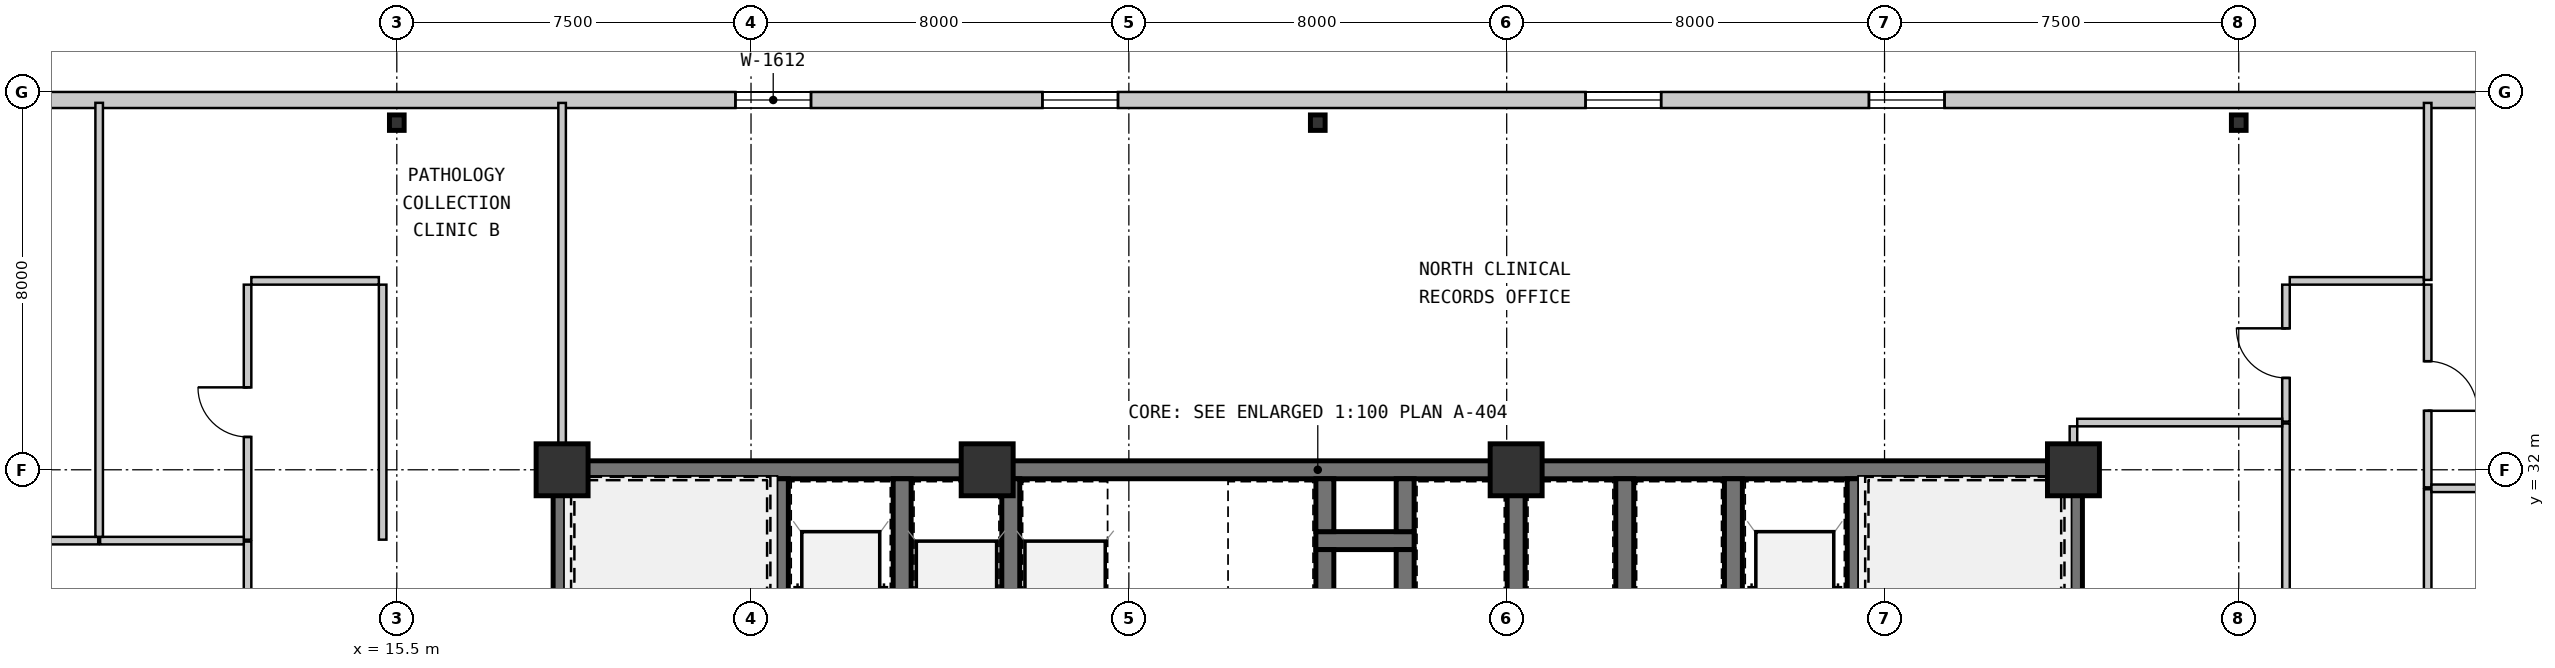
"""IFC4 building model, lengths in metres.
Left out: names, types, materials, properties, quantities, classifications, styles, units other than length and angle.
Written with IfcOpenShell. Run it as: python <this file> out.ifc"""

import sys

from ifc_helpers import new_model, si_unit, direction, frame, frame_2d, origin, origin_2d, place, context, subcontext, project, spatial, rectangle, i_section, extrude, source, transform, mapped, element, fill, save


model = new_model("IFC4")
c1 = context("Model", 3, precision=1e-05, world=origin(), true_north=direction((0.0, 1.0)))
c2 = subcontext(c1, "Body", "Model", "MODEL_VIEW")
j1 = project(units=[si_unit("LENGTHUNIT", "METRE"), si_unit("PLANEANGLEUNIT", "RADIAN")], contexts=[c1])
p1 = place(None, origin())
s1 = spatial("IfcSite", under=j1, at=p1, CompositionType="ELEMENT")
p2 = place(p1, origin())
s2 = spatial("IfcBuilding", under=s1, at=p2, CompositionType="ELEMENT")
p3 = place(p2, frame((0.0, 0.0, 4.55)))
s3 = spatial("IfcBuildingStorey", under=s2, at=p3, CompositionType="ELEMENT", Elevation=4.55)
m1 = source(origin(), c2, "Body", "SweptSolid", [
    extrude(rectangle(XDim=1.1, YDim=1.1, at=origin_2d()), origin(), (0.0, 0.0, 1.0), 3.85),
])
for number, where, z_axis, x_axis in (
    (1, (19.0, 32.0, 0.0), (0.0, 0.0, 1.0), (1.0, 0.0, 0.0)),
    (2, (28.0, 32.0, 0.0), (0.0, 0.0, 1.0), (1.0, 0.0, 0.0)),
    (3, (39.2, 32.0, 0.0), (0.0, 0.0, 1.0), (1.0, 0.0, 0.0)),
    (4, (51.0, 32.0, 0.0), (0.0, 0.0, 1.0), (1.0, 0.0, 0.0)),
):
    element("IfcColumn", number, at=place(p3, frame(where, z_axis=z_axis, x_axis=x_axis)), inside=s3, PredefinedType="COLUMN", context=c2, shape_type="MappedRepresentation", body=[
        mapped(m1, transform((0.0, 0.0, 0.0), scale=1.0)),
    ])
m2 = source(origin(), c2, "Body", "SweptSolid", [
    extrude(i_section(OverallWidth=0.311, OverallDepth=0.327, WebThickness=0.016, FlangeThickness=0.025, at=origin_2d()), origin(), (0.0, 0.0, 1.0), 3.85),
])
for number, where, z_axis, x_axis in (
    (5, (15.5, 39.35, 0.0), (0.0, 0.0, 1.0), (1.0, 0.0, 0.0)),
    (6, (35.0, 39.35, 0.0), (0.0, 0.0, 1.0), (1.0, 0.0, 0.0)),
    (7, (54.5, 39.35, 0.0), (0.0, 0.0, 1.0), (1.0, 0.0, 0.0)),
):
    element("IfcColumn", number, at=place(p3, frame(where, z_axis=z_axis, x_axis=x_axis)), inside=s3, PredefinedType="COLUMN", context=c2, shape_type="MappedRepresentation", body=[
        mapped(m2, transform((0.0, 0.0, 0.0), scale=1.0)),
    ])
m3 = source(origin(), c2, "Body", "SweptSolid", [
    extrude(rectangle(XDim=69.66, YDim=0.34, at=frame_2d((34.83, 0.0))), origin(), (0.0, 0.0, 1.0), 3.59),
])
p4 = place(p3, frame((0.17, 39.83, 0.0), z_axis=(0.0, 0.0, 1.0), x_axis=(1.0, 0.0, 0.0)))
e8 = element("IfcWall", 8, at=p4, inside=s3, PredefinedType="SOLIDWALL", context=c2, shape_type="MappedRepresentation", body=[
    mapped(m3, transform((0.0, 0.0, 0.0), scale=1.0)),
])
m4 = source(origin(), c2, "Body", "SweptSolid", [
    extrude(rectangle(XDim=1.6, YDim=1.2, at=frame_2d((0.8, 0.6))), frame((0.0, 0.18, 0.0), z_axis=(0.0, -1.0, 0.0), x_axis=(1.0, 0.0, 0.0)), (0.0, 0.0, 1.0), 0.36),
])
p5 = place(p4, frame((4.5, 0.0, 0.95)))
e9 = element("IfcOpeningElement", 9, at=p5, cuts=e8, PredefinedType="OPENING", context=c2, shape_type="MappedRepresentation", body=[
    mapped(m4, transform((0.0, 0.0, 0.0), scale=1.0)),
])
p6 = place(p4, frame((22.5, 0.0, 0.95)))
e10 = element("IfcOpeningElement", 10, at=p6, cuts=e8, PredefinedType="OPENING", context=c2, shape_type="MappedRepresentation", body=[
    mapped(m4, transform((0.0, 0.0, 0.0), scale=1.0)),
])
p7 = place(p4, frame((29.0, 0.0, 0.95)))
e11 = element("IfcOpeningElement", 11, at=p7, cuts=e8, PredefinedType="OPENING", context=c2, shape_type="MappedRepresentation", body=[
    mapped(m4, transform((0.0, 0.0, 0.0), scale=1.0)),
])
p8 = place(p4, frame((40.5, 0.0, 0.95)))
e12 = element("IfcOpeningElement", 12, at=p8, cuts=e8, PredefinedType="OPENING", context=c2, shape_type="MappedRepresentation", body=[
    mapped(m4, transform((0.0, 0.0, 0.0), scale=1.0)),
])
p9 = place(p4, frame((46.5, 0.0, 0.95)))
e13 = element("IfcOpeningElement", 13, at=p9, cuts=e8, PredefinedType="OPENING", context=c2, shape_type="MappedRepresentation", body=[
    mapped(m4, transform((0.0, 0.0, 0.0), scale=1.0)),
])
p10 = place(p4, frame((62.5, 0.0, 0.95)))
e14 = element("IfcOpeningElement", 14, at=p10, cuts=e8, PredefinedType="OPENING", context=c2, shape_type="MappedRepresentation", body=[
    mapped(m4, transform((0.0, 0.0, 0.0), scale=1.0)),
])
m5 = source(origin(), c2, "Body", "SweptSolid", [
    extrude(rectangle(XDim=9.19, YDim=0.38, at=frame_2d((4.595, 0.0))), origin(), (0.0, 0.0, 1.0), 3.59),
])
p11 = place(p3, frame((18.81, 32.0, 0.0), z_axis=(0.0, 0.0, 1.0), x_axis=(1.0, 0.0, 0.0)))
e15 = element("IfcWall", 15, at=p11, inside=s3, PredefinedType="SHEAR", context=c2, shape_type="MappedRepresentation", body=[
    mapped(m5, transform((0.0, 0.0, 0.0), scale=1.0)),
])
m6 = source(origin(), c2, "Body", "SweptSolid", [
    extrude(rectangle(XDim=11.2, YDim=0.38, at=frame_2d((5.6, 0.0))), origin(), (0.0, 0.0, 1.0), 3.59),
])
p12 = place(p3, frame((28.0, 32.0, 0.0), z_axis=(0.0, 0.0, 1.0), x_axis=(1.0, 0.0, 0.0)))
e16 = element("IfcWall", 16, at=p12, inside=s3, PredefinedType="SHEAR", context=c2, shape_type="MappedRepresentation", body=[
    mapped(m6, transform((0.0, 0.0, 0.0), scale=1.0)),
])
m7 = source(origin(), c2, "Body", "SweptSolid", [
    extrude(rectangle(XDim=11.99, YDim=0.38, at=frame_2d((5.995, 0.0))), origin(), (0.0, 0.0, 1.0), 3.59),
])
p13 = place(p3, frame((39.2, 32.0, 0.0), z_axis=(0.0, 0.0, 1.0), x_axis=(1.0, 0.0, 0.0)))
e17 = element("IfcWall", 17, at=p13, inside=s3, PredefinedType="SHEAR", context=c2, shape_type="MappedRepresentation", body=[
    mapped(m7, transform((0.0, 0.0, 0.0), scale=1.0)),
])
m8 = source(origin(), c2, "Body", "SweptSolid", [
    extrude(rectangle(XDim=3.61, YDim=0.38, at=frame_2d((1.805, 0.0))), origin(), (0.0, 0.0, 1.0), 3.59),
])
for number, where, z_axis, x_axis in (
    (18, (19.0, 28.2, 0.0), (0.0, 0.0, 1.0), (0.0, 1.0, 0.0)),
    (19, (51.0, 28.2, 0.0), (0.0, 0.0, 1.0), (0.0, 1.0, 0.0)),
):
    element("IfcWall", number, at=place(p3, frame(where, z_axis=z_axis, x_axis=x_axis)), inside=s3, PredefinedType="SHEAR", context=c2, shape_type="MappedRepresentation", body=[
        mapped(m8, transform((0.0, 0.0, 0.0), scale=1.0)),
    ])
m9 = source(origin(), c2, "Body", "SweptSolid", [
    extrude(rectangle(XDim=3.42, YDim=0.38, at=frame_2d((1.71, 0.0))), origin(), (0.0, 0.0, 1.0), 3.59),
])
for number, where, z_axis, x_axis in (
    (20, (23.6, 28.39, 0.0), (0.0, 0.0, 1.0), (0.0, 1.0, 0.0)),
    (21, (26.2, 28.39, 0.0), (0.0, 0.0, 1.0), (0.0, 1.0, 0.0)),
    (22, (46.4, 31.81, 0.0), (0.0, 0.0, 1.0), (0.0, -1.0, 0.0)),
    (23, (43.8, 31.81, 0.0), (0.0, 0.0, 1.0), (0.0, -1.0, 0.0)),
):
    element("IfcWall", number, at=place(p3, frame(where, z_axis=z_axis, x_axis=x_axis)), inside=s3, PredefinedType="SHEAR", context=c2, shape_type="MappedRepresentation", body=[
        mapped(m9, transform((0.0, 0.0, 0.0), scale=1.0)),
    ])
m10 = source(origin(), c2, "Body", "SweptSolid", [
    extrude(rectangle(XDim=2.08, YDim=0.38, at=frame_2d((1.04, 0.0))), origin(), (0.0, 0.0, 1.0), 3.59),
])
p14 = place(p3, frame((34.96, 30.5, 0.0), z_axis=(0.0, 0.0, 1.0), x_axis=(1.0, 0.0, 0.0)))
e24 = element("IfcWall", 24, at=p14, inside=s3, PredefinedType="SHEAR", context=c2, shape_type="MappedRepresentation", body=[
    mapped(m10, transform((0.0, 0.0, 0.0), scale=1.0)),
])
m11 = source(origin(), c2, "Body", "SweptSolid", [
    extrude(rectangle(XDim=1.12, YDim=0.38, at=frame_2d((0.56, 0.0))), origin(), (0.0, 0.0, 1.0), 3.59),
])
for number, where, z_axis, x_axis in (
    (25, (35.15, 31.81, 0.0), (0.0, 0.0, 1.0), (0.0, -1.0, 0.0)),
    (26, (36.85, 30.69, 0.0), (0.0, 0.0, 1.0), (0.0, 1.0, 0.0)),
    (27, (35.15, 30.31, 0.0), (0.0, 0.0, 1.0), (0.0, -1.0, 0.0)),
    (28, (36.85, 29.19, 0.0), (0.0, 0.0, 1.0), (0.0, 1.0, 0.0)),
):
    element("IfcWall", number, at=place(p3, frame(where, z_axis=z_axis, x_axis=x_axis)), inside=s3, PredefinedType="SHEAR", context=c2, shape_type="MappedRepresentation", body=[
        mapped(m11, transform((0.0, 0.0, 0.0), scale=1.0)),
    ])
for number, where, z_axis, x_axis in (
    (29, (28.5, 28.39, 0.0), (0.0, 0.0, 1.0), (0.0, 1.0, 0.0)),
    (30, (39.2, 28.39, 0.0), (0.0, 0.0, 1.0), (0.0, 1.0, 0.0)),
    (31, (41.5, 28.39, 0.0), (0.0, 0.0, 1.0), (0.0, 1.0, 0.0)),
):
    element("IfcWall", number, at=place(p3, frame(where, z_axis=z_axis, x_axis=x_axis)), inside=s3, PredefinedType="SHEAR", context=c2, shape_type="MappedRepresentation", body=[
        mapped(m9, transform((0.0, 0.0, 0.0), scale=1.0)),
    ])
m12 = source(origin(), c2, "Body", "SweptSolid", [
    extrude(rectangle(XDim=6.4, YDim=0.16, at=frame_2d((3.2, 0.0))), origin(), (0.0, 0.0, 1.0), 3.59),
])
p15 = place(p3, frame((12.34, 24.08, 0.0), z_axis=(0.0, 0.0, 1.0), x_axis=(0.0, 1.0, 0.0)))
e32 = element("IfcWall", 32, at=p15, inside=s3, PredefinedType="PARTITIONING", context=c2, shape_type="MappedRepresentation", body=[
    mapped(m12, transform((0.0, 0.0, 0.0), scale=1.0)),
])
m13 = source(origin(), c2, "Body", "SweptSolid", [
    extrude(rectangle(XDim=1.05, YDim=2.1, at=frame_2d((0.525, 1.05))), frame((0.0, 0.09, 0.0), z_axis=(0.0, -1.0, 0.0), x_axis=(1.0, 0.0, 0.0)), (0.0, 0.0, 1.0), 0.18),
])
p16 = place(p15, frame((2.645, 0.0, 0.0)))
e33 = element("IfcOpeningElement", 33, at=p16, cuts=e32, PredefinedType="OPENING", context=c2, shape_type="MappedRepresentation", body=[
    mapped(m13, transform((0.0, 0.0, 0.0), scale=1.0)),
])
m14 = source(origin(), c2, "Body", "SweptSolid", [
    extrude(rectangle(XDim=5.4, YDim=0.16, at=frame_2d((2.7, 0.0))), origin(), (0.0, 0.0, 1.0), 3.59),
])
p17 = place(p3, frame((12.34, 30.52, 0.0), z_axis=(0.0, 0.0, 1.0), x_axis=(0.0, 1.0, 0.0)))
e34 = element("IfcWall", 34, at=p17, inside=s3, PredefinedType="PARTITIONING", context=c2, shape_type="MappedRepresentation", body=[
    mapped(m14, transform((0.0, 0.0, 0.0), scale=1.0)),
])
p18 = place(p17, frame((2.175, 0.0, 0.0)))
e35 = element("IfcOpeningElement", 35, at=p18, cuts=e34, PredefinedType="OPENING", context=c2, shape_type="MappedRepresentation", body=[
    mapped(m13, transform((0.0, 0.0, 0.0), scale=1.0)),
])
p19 = place(p3, frame((15.2, 35.92, 0.0), z_axis=(0.0, 0.0, 1.0), x_axis=(0.0, -1.0, 0.0)))
e36 = element("IfcWall", 36, at=p19, inside=s3, PredefinedType="PARTITIONING", context=c2, shape_type="MappedRepresentation", body=[
    mapped(m14, transform((0.0, 0.0, 0.0), scale=1.0)),
])
m15 = source(origin(), c2, "Body", "SweptSolid", [
    extrude(rectangle(XDim=2.7, YDim=0.16, at=frame_2d((1.35, 0.0))), origin(), (0.0, 0.0, 1.0), 3.59),
])
p20 = place(p3, frame((12.42, 36.0, 0.0), z_axis=(0.0, 0.0, 1.0), x_axis=(1.0, 0.0, 0.0)))
e37 = element("IfcWall", 37, at=p20, inside=s3, PredefinedType="PARTITIONING", context=c2, shape_type="MappedRepresentation", body=[
    mapped(m15, transform((0.0, 0.0, 0.0), scale=1.0)),
])
m16 = source(origin(), c2, "Body", "SweptSolid", [
    extrude(rectangle(XDim=7.508, YDim=0.16, at=frame_2d((3.754, 0.0))), origin(), (0.0, 0.0, 1.0), 3.59),
])
p21 = place(p3, frame((58.5, 31.588, 0.0), z_axis=(0.0, 0.0, 1.0), x_axis=(0.0, -1.0, 0.0)))
e38 = element("IfcWall", 38, at=p21, inside=s3, PredefinedType="PARTITIONING", context=c2, shape_type="MappedRepresentation", body=[
    mapped(m16, transform((0.0, 0.0, 0.0), scale=1.0)),
])
m17 = source(origin(), c2, "Body", "SweptSolid", [
    extrude(rectangle(XDim=4.292, YDim=0.16, at=frame_2d((2.146, 0.0))), origin(), (0.0, 0.0, 1.0), 3.59),
])
p22 = place(p3, frame((58.5, 35.92, 0.0), z_axis=(0.0, 0.0, 1.0), x_axis=(0.0, -1.0, 0.0)))
e39 = element("IfcWall", 39, at=p22, inside=s3, PredefinedType="PARTITIONING", context=c2, shape_type="MappedRepresentation", body=[
    mapped(m17, transform((0.0, 0.0, 0.0), scale=1.0)),
])
p23 = place(p22, frame((1.621, 0.0, 0.0)))
e40 = element("IfcOpeningElement", 40, at=p23, cuts=e39, PredefinedType="OPENING", context=c2, shape_type="MappedRepresentation", body=[
    mapped(m13, transform((0.0, 0.0, 0.0), scale=1.0)),
])
m18 = source(origin(), c2, "Body", "SweptSolid", [
    extrude(rectangle(XDim=8.9, YDim=0.16, at=frame_2d((4.45, 0.0))), origin(), (0.0, 0.0, 1.0), 3.59),
])
p24 = place(p3, frame((55.5, 24.08, 0.0), z_axis=(0.0, 0.0, 1.0), x_axis=(0.0, 1.0, 0.0)))
e41 = element("IfcWall", 41, at=p24, inside=s3, PredefinedType="PARTITIONING", context=c2, shape_type="MappedRepresentation", body=[
    mapped(m18, transform((0.0, 0.0, 0.0), scale=1.0)),
])
p25 = place(p24, frame((3.895, 0.0, 0.0)))
e42 = element("IfcOpeningElement", 42, at=p25, cuts=e41, PredefinedType="OPENING", context=c2, shape_type="MappedRepresentation", body=[
    mapped(m13, transform((0.0, 0.0, 0.0), scale=1.0)),
])
m19 = source(origin(), c2, "Body", "SweptSolid", [
    extrude(rectangle(XDim=2.9, YDim=0.16, at=frame_2d((1.45, 0.0))), origin(), (0.0, 0.0, 1.0), 3.59),
])
p26 = place(p3, frame((55.5, 33.02, 0.0), z_axis=(0.0, 0.0, 1.0), x_axis=(0.0, 1.0, 0.0)))
e43 = element("IfcWall", 43, at=p26, inside=s3, PredefinedType="PARTITIONING", context=c2, shape_type="MappedRepresentation", body=[
    mapped(m19, transform((0.0, 0.0, 0.0), scale=1.0)),
])
p27 = place(p26, frame((0.925, 0.0, 0.0)))
e44 = element("IfcOpeningElement", 44, at=p27, cuts=e43, PredefinedType="OPENING", context=c2, shape_type="MappedRepresentation", body=[
    mapped(m13, transform((0.0, 0.0, 0.0), scale=1.0)),
])
m20 = source(origin(), c2, "Body", "SweptSolid", [
    extrude(rectangle(XDim=2.84, YDim=0.16, at=frame_2d((1.42, 0.0))), origin(), (0.0, 0.0, 1.0), 3.59),
])
p28 = place(p3, frame((55.58, 36.0, 0.0), z_axis=(0.0, 0.0, 1.0), x_axis=(1.0, 0.0, 0.0)))
e45 = element("IfcWall", 45, at=p28, inside=s3, PredefinedType="PARTITIONING", context=c2, shape_type="MappedRepresentation", body=[
    mapped(m20, transform((0.0, 0.0, 0.0), scale=1.0)),
])
m21 = source(origin(), c2, "Body", "SweptSolid", [
    extrude(rectangle(XDim=8.948, YDim=0.16, at=frame_2d((4.474, 0.0))), origin(), (0.0, 0.0, 1.0), 3.59),
])
p29 = place(p3, frame((0.23, 30.5, 0.0), z_axis=(0.0, 0.0, 1.0), x_axis=(1.0, 0.0, 0.0)))
e46 = element("IfcWall", 46, at=p29, inside=s3, PredefinedType="PARTITIONING", context=c2, shape_type="MappedRepresentation", body=[
    mapped(m21, transform((0.0, 0.0, 0.0), scale=1.0)),
])
m22 = source(origin(), c2, "Body", "SweptSolid", [
    extrude(rectangle(XDim=0.86, YDim=2.1, at=frame_2d((0.43, 1.05))), frame((0.0, 0.09, 0.0), z_axis=(0.0, -1.0, 0.0), x_axis=(1.0, 0.0, 0.0)), (0.0, 0.0, 1.0), 0.18),
])
p30 = place(p29, frame((4.044, 0.0, 0.0)))
e47 = element("IfcOpeningElement", 47, at=p30, cuts=e46, PredefinedType="OPENING", context=c2, shape_type="MappedRepresentation", body=[
    mapped(m22, transform((0.0, 0.0, 0.0), scale=1.0)),
])
m23 = source(origin(), c2, "Body", "SweptSolid", [
    extrude(rectangle(XDim=3.042, YDim=0.16, at=frame_2d((1.521, 0.0))), origin(), (0.0, 0.0, 1.0), 3.59),
])
p31 = place(p3, frame((9.218, 30.5, 0.0), z_axis=(0.0, 0.0, 1.0), x_axis=(1.0, 0.0, 0.0)))
e48 = element("IfcWall", 48, at=p31, inside=s3, PredefinedType="PARTITIONING", context=c2, shape_type="MappedRepresentation", body=[
    mapped(m23, transform((0.0, 0.0, 0.0), scale=1.0)),
])
m24 = source(origin(), c2, "Body", "SweptSolid", [
    extrude(rectangle(XDim=9.19, YDim=0.16, at=frame_2d((4.595, 0.0))), origin(), (0.0, 0.0, 1.0), 3.59),
])
p32 = place(p3, frame((9.198, 39.77, 0.0), z_axis=(0.0, 0.0, 1.0), x_axis=(0.0, -1.0, 0.0)))
e49 = element("IfcWall", 49, at=p32, inside=s3, PredefinedType="PARTITIONING", context=c2, shape_type="MappedRepresentation", body=[
    mapped(m24, transform((0.0, 0.0, 0.0), scale=1.0)),
])
m25 = source(origin(), c2, "Body", "SweptSolid", [
    extrude(rectangle(XDim=7.578, YDim=0.16, at=frame_2d((3.789, 0.0))), origin(), (0.0, 0.0, 1.0), 3.59),
])
p33 = place(p3, frame((19.0, 39.768, 0.0), z_axis=(0.0, 0.0, 1.0), x_axis=(0.0, -1.0, 0.0)))
e50 = element("IfcWall", 50, at=p33, inside=s3, PredefinedType="PARTITIONING", context=c2, shape_type="MappedRepresentation", body=[
    mapped(m25, transform((0.0, 0.0, 0.0), scale=1.0)),
])
m26 = source(origin(), c2, "Body", "SweptSolid", [
    extrude(rectangle(XDim=11.19, YDim=0.16, at=frame_2d((5.595, 0.0))), origin(), (0.0, 0.0, 1.0), 3.59),
])
p34 = place(p3, frame((58.58, 31.608, 0.0), z_axis=(0.0, 0.0, 1.0), x_axis=(1.0, 0.0, 0.0)))
e51 = element("IfcWall", 51, at=p34, inside=s3, PredefinedType="PARTITIONING", context=c2, shape_type="MappedRepresentation", body=[
    mapped(m26, transform((0.0, 0.0, 0.0), scale=1.0)),
])
m27 = source(origin(), c2, "Body", "SweptSolid", [
    extrude(rectangle(XDim=3.748, YDim=0.16, at=frame_2d((1.874, 0.0))), origin(), (0.0, 0.0, 1.0), 3.59),
])
p35 = place(p3, frame((58.5, 36.02, 0.0), z_axis=(0.0, 0.0, 1.0), x_axis=(0.0, 1.0, 0.0)))
e52 = element("IfcWall", 52, at=p35, inside=s3, PredefinedType="PARTITIONING", context=c2, shape_type="MappedRepresentation", body=[
    mapped(m27, transform((0.0, 0.0, 0.0), scale=1.0)),
])
m28 = source(origin(), c2, "Body", "SweptSolid", [
    extrude(rectangle(XDim=4.34, YDim=0.16, at=frame_2d((2.17, 0.0))), origin(), (0.0, 0.0, 1.0), 3.59),
])
p36 = place(p3, frame((51.08, 33.0, 0.0), z_axis=(0.0, 0.0, 1.0), x_axis=(1.0, 0.0, 0.0)))
e53 = element("IfcWall", 53, at=p36, inside=s3, PredefinedType="PARTITIONING", context=c2, shape_type="MappedRepresentation", body=[
    mapped(m28, transform((0.0, 0.0, 0.0), scale=1.0)),
])
m29 = source(origin(), c2, "Body", "SweptSolid", [
    extrude(rectangle(XDim=0.73, YDim=0.16, at=frame_2d((0.365, 0.0))), origin(), (0.0, 0.0, 1.0), 3.59),
])
p37 = place(p3, frame((51.0, 32.19, 0.0), z_axis=(0.0, 0.0, 1.0), x_axis=(0.0, 1.0, 0.0)))
e54 = element("IfcWall", 54, at=p37, inside=s3, PredefinedType="PARTITIONING", context=c2, shape_type="MappedRepresentation", body=[
    mapped(m29, transform((0.0, 0.0, 0.0), scale=1.0)),
])
m30 = source(origin(), c2, "Body", "SweptSolid", [
    extrude(rectangle(XDim=1.6, YDim=1.2, at=frame_2d((0.8, 0.6))), frame((0.0, 0.03, 0.0), z_axis=(0.0, -1.0, 0.0), x_axis=(1.0, 0.0, 0.0)), (0.0, 0.0, 1.0), 0.06),
])
p38 = place(p6, origin())
e55 = element("IfcWindow", 55, at=p38, inside=s3, PartitioningType="SINGLE_PANEL", PredefinedType="WINDOW", context=c2, shape_type="MappedRepresentation", body=[
    mapped(m30, transform((0.0, 0.0, 0.0), scale=1.0)),
])
fill(e10, e55)
p39 = place(p7, origin())
e56 = element("IfcWindow", 56, at=p39, inside=s3, PartitioningType="SINGLE_PANEL", PredefinedType="WINDOW", context=c2, shape_type="MappedRepresentation", body=[
    mapped(m30, transform((0.0, 0.0, 0.0), scale=1.0)),
])
fill(e11, e56)
p40 = place(p8, origin())
e57 = element("IfcWindow", 57, at=p40, inside=s3, PartitioningType="SINGLE_PANEL", PredefinedType="WINDOW", context=c2, shape_type="MappedRepresentation", body=[
    mapped(m30, transform((0.0, 0.0, 0.0), scale=1.0)),
])
fill(e12, e57)
p41 = place(p9, origin())
e58 = element("IfcWindow", 58, at=p41, inside=s3, PartitioningType="SINGLE_PANEL", PredefinedType="WINDOW", context=c2, shape_type="MappedRepresentation", body=[
    mapped(m30, transform((0.0, 0.0, 0.0), scale=1.0)),
])
fill(e13, e58)
m31 = source(origin(), c2, "Body", "SweptSolid", [
    extrude(rectangle(XDim=1.05, YDim=2.1, at=frame_2d((0.525, 1.05))), frame((0.0, 0.025, 0.0), z_axis=(0.0, -1.0, 0.0), x_axis=(1.0, 0.0, 0.0)), (0.0, 0.0, 1.0), 0.05),
])
p42 = place(p18, origin())
e59 = element("IfcDoor", 59, at=p42, inside=s3, OperationType="SINGLE_SWING_RIGHT", PredefinedType="DOOR", context=c2, shape_type="MappedRepresentation", body=[
    mapped(m31, transform((0.0, 0.0, 0.0), scale=1.0)),
])
fill(e35, e59)
p43 = place(p23, origin())
e60 = element("IfcDoor", 60, at=p43, inside=s3, OperationType="SINGLE_SWING_RIGHT", PredefinedType="DOOR", context=c2, shape_type="MappedRepresentation", body=[
    mapped(m31, transform((0.0, 0.0, 0.0), scale=1.0)),
])
fill(e40, e60)
p44 = place(p27, origin())
e61 = element("IfcDoor", 61, at=p44, inside=s3, OperationType="SINGLE_SWING_RIGHT", PredefinedType="DOOR", context=c2, shape_type="MappedRepresentation", body=[
    mapped(m31, transform((0.0, 0.0, 0.0), scale=1.0)),
])
fill(e44, e61)
save(model, sys.argv[1])
